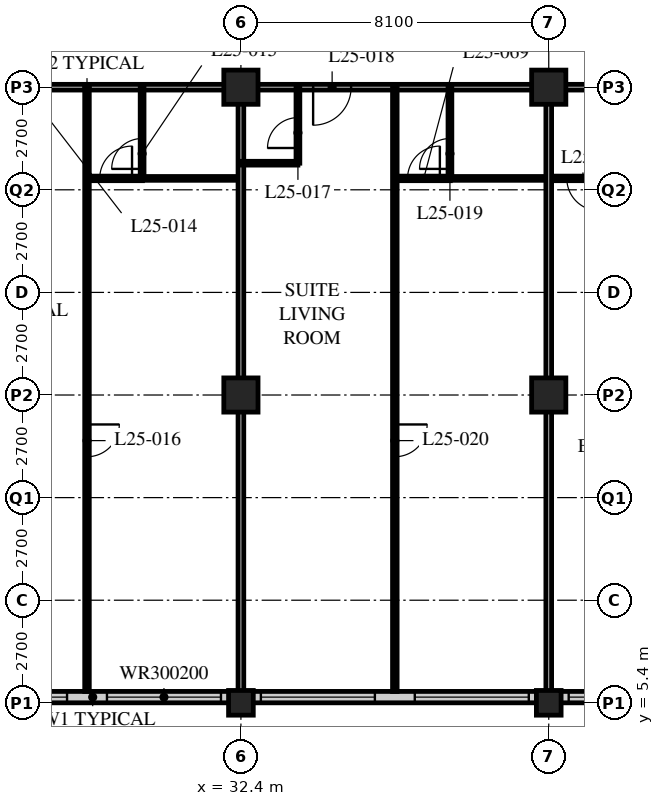
"""IFC4 building model, lengths in metres.
Left out: names, types, materials, properties, quantities, classifications, styles, units other than length and angle.
Written with IfcOpenShell. Run it as: python <this file> out.ifc"""

import sys

from ifc_helpers import new_model, si_unit, direction, frame, frame_2d, origin, origin_2d, place, context, subcontext, project, spatial, rectangle, hollow_rectangle, extrude, element, fill, save


model = new_model("IFC4")
c1 = context("Model", 3, precision=1e-05, world=origin(), true_north=direction((0.0, 1.0)))
c2 = subcontext(c1, "Body", "Model", "MODEL_VIEW")
j1 = project(units=[si_unit("LENGTHUNIT", "METRE"), si_unit("PLANEANGLEUNIT", "RADIAN")], contexts=[c1])
p1 = place(None, origin())
s1 = spatial("IfcSite", under=j1, at=p1, CompositionType="ELEMENT")
p2 = place(p1, origin())
s2 = spatial("IfcBuilding", under=s1, at=p2, CompositionType="ELEMENT")
p3 = place(p2, frame((0.0, 0.0, 103.4)))
s3 = spatial("IfcBuildingStorey", under=s2, at=p3, CompositionType="ELEMENT", Elevation=103.4)
p4 = place(p3, frame((32.4, 5.4, 0.0), z_axis=(0.0, 0.0, 1.0), x_axis=(1.0, 0.0, 0.0)))
e1 = element("IfcColumn", 1, at=p4, inside=s3, PredefinedType="COLUMN", context=c2, shape_type="SweptSolid", body=[
    extrude(hollow_rectangle(XDim=0.65, YDim=0.65, WallThickness=0.055, at=origin_2d()), origin(), (0.0, 0.0, 1.0), 3.4),
])
for number, where, z_axis, x_axis in (
    (2, (32.4, 13.5, 0.0), (0.0, 0.0, 1.0), (1.0, 0.0, 0.0)),
    (3, (32.4, 21.6, 0.0), (0.0, 0.0, 1.0), (1.0, 0.0, 0.0)),
):
    element("IfcColumn", number, at=place(p3, frame(where, z_axis=z_axis, x_axis=x_axis)), inside=s3, PredefinedType="COLUMN", context=c2, shape_type="SweptSolid", body=[
        extrude(hollow_rectangle(XDim=0.9, YDim=0.9, WallThickness=0.1, at=origin_2d()), origin(), (0.0, 0.0, 1.0), 3.4),
    ])
p5 = place(p3, frame((40.5, 5.4, 0.0), z_axis=(0.0, 0.0, 1.0), x_axis=(1.0, 0.0, 0.0)))
e4 = element("IfcColumn", 4, at=p5, inside=s3, PredefinedType="COLUMN", context=c2, shape_type="SweptSolid", body=[
    extrude(hollow_rectangle(XDim=0.65, YDim=0.65, WallThickness=0.055, at=origin_2d()), origin(), (0.0, 0.0, 1.0), 3.4),
])
for number, where, z_axis, x_axis in (
    (5, (40.5, 13.5, 0.0), (0.0, 0.0, 1.0), (1.0, 0.0, 0.0)),
    (6, (40.5, 21.6, 0.0), (0.0, 0.0, 1.0), (1.0, 0.0, 0.0)),
):
    element("IfcColumn", number, at=place(p3, frame(where, z_axis=z_axis, x_axis=x_axis)), inside=s3, PredefinedType="COLUMN", context=c2, shape_type="SweptSolid", body=[
        extrude(hollow_rectangle(XDim=0.9, YDim=0.9, WallThickness=0.1, at=origin_2d()), origin(), (0.0, 0.0, 1.0), 3.4),
    ])
p6 = place(p3, frame((8.4, 5.55, 0.0), z_axis=(0.0, 0.0, 1.0), x_axis=(1.0, 0.0, 0.0)))
e7 = element("IfcWall", 7, at=p6, inside=s3, PredefinedType="SOLIDWALL", context=c2, shape_type="SweptSolid", body=[
    extrude(rectangle(XDim=40.2, YDim=0.3, at=frame_2d((20.1, 0.0))), origin(), (0.0, 0.0, 1.0), 3.19),
])
p7 = place(p6, frame((0.225, 0.0, 0.9)))
e8 = element("IfcOpeningElement", 8, at=p7, cuts=e7, PredefinedType="OPENING", context=c2, shape_type="SweptSolid", body=[
    extrude(rectangle(XDim=3.0, YDim=2.0, at=frame_2d((1.5, 1.0))), frame((0.0, 0.16, 0.0), z_axis=(0.0, -1.0, 0.0), x_axis=(1.0, 0.0, 0.0)), (0.0, 0.0, 1.0), 0.32),
])
p8 = place(p6, frame((4.275, 0.0, 0.9)))
e9 = element("IfcOpeningElement", 9, at=p8, cuts=e7, PredefinedType="OPENING", context=c2, shape_type="SweptSolid", body=[
    extrude(rectangle(XDim=3.0, YDim=2.0, at=frame_2d((1.5, 1.0))), frame((0.0, 0.16, 0.0), z_axis=(0.0, -1.0, 0.0), x_axis=(1.0, 0.0, 0.0)), (0.0, 0.0, 1.0), 0.32),
])
p9 = place(p6, frame((8.325, 0.0, 0.9)))
e10 = element("IfcOpeningElement", 10, at=p9, cuts=e7, PredefinedType="OPENING", context=c2, shape_type="SweptSolid", body=[
    extrude(rectangle(XDim=3.0, YDim=2.0, at=frame_2d((1.5, 1.0))), frame((0.0, 0.16, 0.0), z_axis=(0.0, -1.0, 0.0), x_axis=(1.0, 0.0, 0.0)), (0.0, 0.0, 1.0), 0.32),
])
p10 = place(p6, frame((12.375, 0.0, 0.9)))
e11 = element("IfcOpeningElement", 11, at=p10, cuts=e7, PredefinedType="OPENING", context=c2, shape_type="SweptSolid", body=[
    extrude(rectangle(XDim=3.0, YDim=2.0, at=frame_2d((1.5, 1.0))), frame((0.0, 0.16, 0.0), z_axis=(0.0, -1.0, 0.0), x_axis=(1.0, 0.0, 0.0)), (0.0, 0.0, 1.0), 0.32),
])
p11 = place(p6, frame((16.425, 0.0, 0.9)))
e12 = element("IfcOpeningElement", 12, at=p11, cuts=e7, PredefinedType="OPENING", context=c2, shape_type="SweptSolid", body=[
    extrude(rectangle(XDim=3.0, YDim=2.0, at=frame_2d((1.5, 1.0))), frame((0.0, 0.16, 0.0), z_axis=(0.0, -1.0, 0.0), x_axis=(1.0, 0.0, 0.0)), (0.0, 0.0, 1.0), 0.32),
])
p12 = place(p6, frame((20.475, 0.0, 0.9)))
e13 = element("IfcOpeningElement", 13, at=p12, cuts=e7, PredefinedType="OPENING", context=c2, shape_type="SweptSolid", body=[
    extrude(rectangle(XDim=3.0, YDim=2.0, at=frame_2d((1.5, 1.0))), frame((0.0, 0.16, 0.0), z_axis=(0.0, -1.0, 0.0), x_axis=(1.0, 0.0, 0.0)), (0.0, 0.0, 1.0), 0.32),
])
p13 = place(p6, frame((24.525, 0.0, 0.9)))
e14 = element("IfcOpeningElement", 14, at=p13, cuts=e7, PredefinedType="OPENING", context=c2, shape_type="SweptSolid", body=[
    extrude(rectangle(XDim=3.0, YDim=2.0, at=frame_2d((1.5, 1.0))), frame((0.0, 0.16, 0.0), z_axis=(0.0, -1.0, 0.0), x_axis=(1.0, 0.0, 0.0)), (0.0, 0.0, 1.0), 0.32),
])
p14 = place(p6, frame((28.575, 0.0, 0.9)))
e15 = element("IfcOpeningElement", 15, at=p14, cuts=e7, PredefinedType="OPENING", context=c2, shape_type="SweptSolid", body=[
    extrude(rectangle(XDim=3.0, YDim=2.0, at=frame_2d((1.5, 1.0))), frame((0.0, 0.16, 0.0), z_axis=(0.0, -1.0, 0.0), x_axis=(1.0, 0.0, 0.0)), (0.0, 0.0, 1.0), 0.32),
])
p15 = place(p6, frame((32.625, 0.0, 0.9)))
e16 = element("IfcOpeningElement", 16, at=p15, cuts=e7, PredefinedType="OPENING", context=c2, shape_type="SweptSolid", body=[
    extrude(rectangle(XDim=3.0, YDim=2.0, at=frame_2d((1.5, 1.0))), frame((0.0, 0.16, 0.0), z_axis=(0.0, -1.0, 0.0), x_axis=(1.0, 0.0, 0.0)), (0.0, 0.0, 1.0), 0.32),
])
p16 = place(p6, frame((36.675, 0.0, 0.9)))
e17 = element("IfcOpeningElement", 17, at=p16, cuts=e7, PredefinedType="OPENING", context=c2, shape_type="SweptSolid", body=[
    extrude(rectangle(XDim=3.0, YDim=2.0, at=frame_2d((1.5, 1.0))), frame((0.0, 0.16, 0.0), z_axis=(0.0, -1.0, 0.0), x_axis=(1.0, 0.0, 0.0)), (0.0, 0.0, 1.0), 0.32),
])
p17 = place(p3, frame((12.15, 21.6, 0.0), z_axis=(0.0, 0.0, 1.0), x_axis=(1.0, 0.0, 0.0)))
e18 = element("IfcWall", 18, at=p17, inside=s3, PredefinedType="PARTITIONING", context=c2, shape_type="SweptSolid", body=[
    extrude(rectangle(XDim=32.4, YDim=0.15, at=frame_2d((16.2, 0.0))), origin(), (0.0, 0.0, 1.0), 2.578),
])
p18 = place(p17, frame((5.95, 0.0, 0.0)))
e19 = element("IfcOpeningElement", 19, at=p18, cuts=e18, PredefinedType="OPENING", context=c2, shape_type="SweptSolid", body=[
    extrude(rectangle(XDim=1.0, YDim=2.1, at=frame_2d((0.5, 1.05))), frame((0.0, 0.085, 0.0), z_axis=(0.0, -1.0, 0.0), x_axis=(1.0, 0.0, 0.0)), (0.0, 0.0, 1.0), 0.17),
])
p19 = place(p17, frame((14.05, 0.0, 0.0)))
e20 = element("IfcOpeningElement", 20, at=p19, cuts=e18, PredefinedType="OPENING", context=c2, shape_type="SweptSolid", body=[
    extrude(rectangle(XDim=1.0, YDim=2.1, at=frame_2d((0.5, 1.05))), frame((0.0, 0.085, 0.0), z_axis=(0.0, -1.0, 0.0), x_axis=(1.0, 0.0, 0.0)), (0.0, 0.0, 1.0), 0.17),
])
p20 = place(p17, frame((22.15, 0.0, 0.0)))
e21 = element("IfcOpeningElement", 21, at=p20, cuts=e18, PredefinedType="OPENING", context=c2, shape_type="SweptSolid", body=[
    extrude(rectangle(XDim=1.0, YDim=2.1, at=frame_2d((0.5, 1.05))), frame((0.0, 0.085, 0.0), z_axis=(0.0, -1.0, 0.0), x_axis=(1.0, 0.0, 0.0)), (0.0, 0.0, 1.0), 0.17),
])
p21 = place(p17, frame((1.525, 0.0, 0.0)))
e22 = element("IfcOpeningElement", 22, at=p21, cuts=e18, PredefinedType="OPENING", context=c2, shape_type="SweptSolid", body=[
    extrude(rectangle(XDim=1.0, YDim=2.1, at=frame_2d((0.5, 1.05))), frame((0.0, 0.085, 0.0), z_axis=(0.0, -1.0, 0.0), x_axis=(1.0, 0.0, 0.0)), (0.0, 0.0, 1.0), 0.17),
])
p22 = place(p17, frame((29.875, 0.0, 0.0)))
e23 = element("IfcOpeningElement", 23, at=p22, cuts=e18, PredefinedType="OPENING", context=c2, shape_type="SweptSolid", body=[
    extrude(rectangle(XDim=1.0, YDim=2.1, at=frame_2d((0.5, 1.05))), frame((0.0, 0.085, 0.0), z_axis=(0.0, -1.0, 0.0), x_axis=(1.0, 0.0, 0.0)), (0.0, 0.0, 1.0), 0.17),
])
p23 = place(p3, frame((29.8, 19.2, 0.0), z_axis=(0.0, 0.0, 1.0), x_axis=(1.0, 0.0, 0.0)))
e24 = element("IfcWall", 24, at=p23, inside=s3, PredefinedType="PARTITIONING", context=c2, shape_type="SweptSolid", body=[
    extrude(rectangle(XDim=2.6, YDim=0.1, at=frame_2d((1.3, 0.0))), origin(), (0.0, 0.0, 1.0), 3.19),
])
p24 = place(p3, frame((29.8, 21.6, 0.0), z_axis=(0.0, 0.0, 1.0), x_axis=(0.0, -1.0, 0.0)))
e25 = element("IfcWall", 25, at=p24, inside=s3, PredefinedType="PARTITIONING", context=c2, shape_type="SweptSolid", body=[
    extrude(rectangle(XDim=2.4, YDim=0.1, at=frame_2d((1.2, 0.0))), origin(), (0.0, 0.0, 1.0), 3.19),
])
p25 = place(p24, frame((1.35, 0.0, 0.0)))
e26 = element("IfcOpeningElement", 26, at=p25, cuts=e25, PredefinedType="OPENING", context=c2, shape_type="SweptSolid", body=[
    extrude(rectangle(XDim=0.8, YDim=2.1, at=frame_2d((0.4, 1.05))), frame((0.0, 0.06, 0.0), z_axis=(0.0, -1.0, 0.0), x_axis=(1.0, 0.0, 0.0)), (0.0, 0.0, 1.0), 0.12),
])
p26 = place(p3, frame((28.35, 21.6, 0.0), z_axis=(0.0, 0.0, 1.0), x_axis=(0.0, -1.0, 0.0)))
e27 = element("IfcWall", 27, at=p26, inside=s3, PredefinedType="PARTITIONING", context=c2, shape_type="SweptSolid", body=[
    extrude(rectangle(XDim=15.9, YDim=0.12, at=frame_2d((7.95, 0.0))), origin(), (0.0, 0.0, 1.0), 3.19),
])
p27 = place(p26, frame((8.875, 0.0, 0.0)))
e28 = element("IfcOpeningElement", 28, at=p27, cuts=e27, PredefinedType="OPENING", context=c2, shape_type="SweptSolid", body=[
    extrude(rectangle(XDim=0.85, YDim=2.1, at=frame_2d((0.425, 1.05))), frame((0.0, 0.07, 0.0), z_axis=(0.0, -1.0, 0.0), x_axis=(1.0, 0.0, 0.0)), (0.0, 0.0, 1.0), 0.14),
])
p28 = place(p3, frame((32.4, 21.6, 0.0), z_axis=(0.0, 0.0, 1.0), x_axis=(0.0, -1.0, 0.0)))
e29 = element("IfcWall", 29, at=p28, inside=s3, PredefinedType="PARTITIONING", context=c2, shape_type="SweptSolid", body=[
    extrude(rectangle(XDim=15.9, YDim=0.15, at=frame_2d((7.95, 0.0))), origin(), (0.0, 0.0, 1.0), 2.578),
])
p29 = place(p3, frame((32.4, 19.6, 0.0), z_axis=(0.0, 0.0, 1.0), x_axis=(1.0, 0.0, 0.0)))
e30 = element("IfcWall", 30, at=p29, inside=s3, PredefinedType="PARTITIONING", context=c2, shape_type="SweptSolid", body=[
    extrude(rectangle(XDim=1.5, YDim=0.1, at=frame_2d((0.75, 0.0))), origin(), (0.0, 0.0, 1.0), 3.19),
])
p30 = place(p3, frame((33.9, 21.6, 0.0), z_axis=(0.0, 0.0, 1.0), x_axis=(0.0, -1.0, 0.0)))
e31 = element("IfcWall", 31, at=p30, inside=s3, PredefinedType="PARTITIONING", context=c2, shape_type="SweptSolid", body=[
    extrude(rectangle(XDim=2.0, YDim=0.1, at=frame_2d((1.0, 0.0))), origin(), (0.0, 0.0, 1.0), 3.19),
])
p31 = place(p30, frame((0.8, 0.0, 0.0)))
e32 = element("IfcOpeningElement", 32, at=p31, cuts=e31, PredefinedType="OPENING", context=c2, shape_type="SweptSolid", body=[
    extrude(rectangle(XDim=0.8, YDim=2.1, at=frame_2d((0.4, 1.05))), frame((0.0, 0.06, 0.0), z_axis=(0.0, -1.0, 0.0), x_axis=(1.0, 0.0, 0.0)), (0.0, 0.0, 1.0), 0.12),
])
p32 = place(p3, frame((37.9, 19.2, 0.0), z_axis=(0.0, 0.0, 1.0), x_axis=(1.0, 0.0, 0.0)))
e33 = element("IfcWall", 33, at=p32, inside=s3, PredefinedType="PARTITIONING", context=c2, shape_type="SweptSolid", body=[
    extrude(rectangle(XDim=2.6, YDim=0.1, at=frame_2d((1.3, 0.0))), origin(), (0.0, 0.0, 1.0), 3.19),
])
p33 = place(p3, frame((37.9, 21.6, 0.0), z_axis=(0.0, 0.0, 1.0), x_axis=(0.0, -1.0, 0.0)))
e34 = element("IfcWall", 34, at=p33, inside=s3, PredefinedType="PARTITIONING", context=c2, shape_type="SweptSolid", body=[
    extrude(rectangle(XDim=2.4, YDim=0.1, at=frame_2d((1.2, 0.0))), origin(), (0.0, 0.0, 1.0), 3.19),
])
p34 = place(p33, frame((1.35, 0.0, 0.0)))
e35 = element("IfcOpeningElement", 35, at=p34, cuts=e34, PredefinedType="OPENING", context=c2, shape_type="SweptSolid", body=[
    extrude(rectangle(XDim=0.8, YDim=2.1, at=frame_2d((0.4, 1.05))), frame((0.0, 0.06, 0.0), z_axis=(0.0, -1.0, 0.0), x_axis=(1.0, 0.0, 0.0)), (0.0, 0.0, 1.0), 0.12),
])
p35 = place(p3, frame((36.45, 21.6, 0.0), z_axis=(0.0, 0.0, 1.0), x_axis=(0.0, -1.0, 0.0)))
e36 = element("IfcWall", 36, at=p35, inside=s3, PredefinedType="PARTITIONING", context=c2, shape_type="SweptSolid", body=[
    extrude(rectangle(XDim=15.9, YDim=0.12, at=frame_2d((7.95, 0.0))), origin(), (0.0, 0.0, 1.0), 3.19),
])
p36 = place(p35, frame((8.875, 0.0, 0.0)))
e37 = element("IfcOpeningElement", 37, at=p36, cuts=e36, PredefinedType="OPENING", context=c2, shape_type="SweptSolid", body=[
    extrude(rectangle(XDim=0.85, YDim=2.1, at=frame_2d((0.425, 1.05))), frame((0.0, 0.07, 0.0), z_axis=(0.0, -1.0, 0.0), x_axis=(1.0, 0.0, 0.0)), (0.0, 0.0, 1.0), 0.14),
])
p37 = place(p3, frame((40.5, 19.2, 0.0), z_axis=(0.0, 0.0, 1.0), x_axis=(1.0, 0.0, 0.0)))
e38 = element("IfcWall", 38, at=p37, inside=s3, PredefinedType="PARTITIONING", context=c2, shape_type="SweptSolid", body=[
    extrude(rectangle(XDim=8.05, YDim=0.12, at=frame_2d((4.025, 0.0))), origin(), (0.0, 0.0, 1.0), 3.19),
])
p38 = place(p37, frame((0.475, 0.0, 0.0)))
e39 = element("IfcOpeningElement", 39, at=p38, cuts=e38, PredefinedType="OPENING", context=c2, shape_type="SweptSolid", body=[
    extrude(rectangle(XDim=0.85, YDim=2.1, at=frame_2d((0.425, 1.05))), frame((0.0, 0.07, 0.0), z_axis=(0.0, -1.0, 0.0), x_axis=(1.0, 0.0, 0.0)), (0.0, 0.0, 1.0), 0.14),
])
p39 = place(p37, frame((4.325, 0.0, 0.0)))
e40 = element("IfcOpeningElement", 40, at=p39, cuts=e38, PredefinedType="OPENING", context=c2, shape_type="SweptSolid", body=[
    extrude(rectangle(XDim=0.85, YDim=2.1, at=frame_2d((0.425, 1.05))), frame((0.0, 0.07, 0.0), z_axis=(0.0, -1.0, 0.0), x_axis=(1.0, 0.0, 0.0)), (0.0, 0.0, 1.0), 0.14),
])
p40 = place(p3, frame((40.5, 21.6, 0.0), z_axis=(0.0, 0.0, 1.0), x_axis=(0.0, -1.0, 0.0)))
e41 = element("IfcWall", 41, at=p40, inside=s3, PredefinedType="PARTITIONING", context=c2, shape_type="SweptSolid", body=[
    extrude(rectangle(XDim=15.9, YDim=0.15, at=frame_2d((7.95, 0.0))), origin(), (0.0, 0.0, 1.0), 2.578),
])
p41 = place(p3, frame((29.81, 19.2, 0.0), z_axis=(0.0, 0.0, 1.0), x_axis=(-1.0, 0.0, 0.0)))
e42 = element("IfcWall", 42, at=p41, inside=s3, PredefinedType="PARTITIONING", context=c2, shape_type="SweptSolid", body=[
    extrude(rectangle(XDim=1.46, YDim=0.12, at=frame_2d((0.73, 0.0))), origin(), (0.0, 0.0, 1.0), 3.19),
])
p42 = place(p41, frame((0.275, 0.0, 0.0)))
e43 = element("IfcOpeningElement", 43, at=p42, cuts=e42, PredefinedType="OPENING", context=c2, shape_type="SweptSolid", body=[
    extrude(rectangle(XDim=0.85, YDim=2.1, at=frame_2d((0.425, 1.05))), frame((0.0, 0.07, 0.0), z_axis=(0.0, -1.0, 0.0), x_axis=(1.0, 0.0, 0.0)), (0.0, 0.0, 1.0), 0.14),
])
p43 = place(p3, frame((37.91, 19.2, 0.0), z_axis=(0.0, 0.0, 1.0), x_axis=(-1.0, 0.0, 0.0)))
e44 = element("IfcWall", 44, at=p43, inside=s3, PredefinedType="PARTITIONING", context=c2, shape_type="SweptSolid", body=[
    extrude(rectangle(XDim=1.46, YDim=0.12, at=frame_2d((0.73, 0.0))), origin(), (0.0, 0.0, 1.0), 3.19),
])
p44 = place(p43, frame((0.275, 0.0, 0.0)))
e45 = element("IfcOpeningElement", 45, at=p44, cuts=e44, PredefinedType="OPENING", context=c2, shape_type="SweptSolid", body=[
    extrude(rectangle(XDim=0.85, YDim=2.1, at=frame_2d((0.425, 1.05))), frame((0.0, 0.07, 0.0), z_axis=(0.0, -1.0, 0.0), x_axis=(1.0, 0.0, 0.0)), (0.0, 0.0, 1.0), 0.14),
])
p45 = place(p11, origin())
e46 = element("IfcWindow", 46, at=p45, inside=s3, PartitioningType="SINGLE_PANEL", PredefinedType="WINDOW", context=c2, shape_type="SweptSolid", body=[
    extrude(rectangle(XDim=3.0, YDim=2.0, at=frame_2d((1.5, 1.0))), frame((0.0, 0.03, 0.0), z_axis=(0.0, -1.0, 0.0), x_axis=(1.0, 0.0, 0.0)), (0.0, 0.0, 1.0), 0.06),
])
fill(e12, e46)
p46 = place(p12, origin())
e47 = element("IfcWindow", 47, at=p46, inside=s3, PartitioningType="SINGLE_PANEL", PredefinedType="WINDOW", context=c2, shape_type="SweptSolid", body=[
    extrude(rectangle(XDim=3.0, YDim=2.0, at=frame_2d((1.5, 1.0))), frame((0.0, 0.03, 0.0), z_axis=(0.0, -1.0, 0.0), x_axis=(1.0, 0.0, 0.0)), (0.0, 0.0, 1.0), 0.06),
])
fill(e13, e47)
p47 = place(p13, origin())
e48 = element("IfcWindow", 48, at=p47, inside=s3, PartitioningType="SINGLE_PANEL", PredefinedType="WINDOW", context=c2, shape_type="SweptSolid", body=[
    extrude(rectangle(XDim=3.0, YDim=2.0, at=frame_2d((1.5, 1.0))), frame((0.0, 0.03, 0.0), z_axis=(0.0, -1.0, 0.0), x_axis=(1.0, 0.0, 0.0)), (0.0, 0.0, 1.0), 0.06),
])
fill(e14, e48)
p48 = place(p14, origin())
e49 = element("IfcWindow", 49, at=p48, inside=s3, PartitioningType="SINGLE_PANEL", PredefinedType="WINDOW", context=c2, shape_type="SweptSolid", body=[
    extrude(rectangle(XDim=3.0, YDim=2.0, at=frame_2d((1.5, 1.0))), frame((0.0, 0.03, 0.0), z_axis=(0.0, -1.0, 0.0), x_axis=(1.0, 0.0, 0.0)), (0.0, 0.0, 1.0), 0.06),
])
fill(e15, e49)
p49 = place(p15, origin())
e50 = element("IfcWindow", 50, at=p49, inside=s3, PartitioningType="SINGLE_PANEL", PredefinedType="WINDOW", context=c2, shape_type="SweptSolid", body=[
    extrude(rectangle(XDim=3.0, YDim=2.0, at=frame_2d((1.5, 1.0))), frame((0.0, 0.03, 0.0), z_axis=(0.0, -1.0, 0.0), x_axis=(1.0, 0.0, 0.0)), (0.0, 0.0, 1.0), 0.06),
])
fill(e16, e50)
p50 = place(p25, origin())
e51 = element("IfcDoor", 51, at=p50, inside=s3, OperationType="SINGLE_SWING_LEFT", PredefinedType="DOOR", context=c2, shape_type="SweptSolid", body=[
    extrude(rectangle(XDim=0.8, YDim=2.1, at=frame_2d((0.4, 1.05))), frame((0.0, 0.025, 0.0), z_axis=(0.0, -1.0, 0.0), x_axis=(1.0, 0.0, 0.0)), (0.0, 0.0, 1.0), 0.05),
])
fill(e26, e51)
p51 = place(p27, origin())
e52 = element("IfcDoor", 52, at=p51, inside=s3, OperationType="SINGLE_SWING_LEFT", PredefinedType="DOOR", context=c2, shape_type="SweptSolid", body=[
    extrude(rectangle(XDim=0.85, YDim=2.1, at=frame_2d((0.425, 1.05))), frame((0.0, 0.025, 0.0), z_axis=(0.0, -1.0, 0.0), x_axis=(1.0, 0.0, 0.0)), (0.0, 0.0, 1.0), 0.05),
])
fill(e28, e52)
p52 = place(p31, origin())
e53 = element("IfcDoor", 53, at=p52, inside=s3, OperationType="SINGLE_SWING_LEFT", PredefinedType="DOOR", context=c2, shape_type="SweptSolid", body=[
    extrude(rectangle(XDim=0.8, YDim=2.1, at=frame_2d((0.4, 1.05))), frame((0.0, 0.025, 0.0), z_axis=(0.0, -1.0, 0.0), x_axis=(1.0, 0.0, 0.0)), (0.0, 0.0, 1.0), 0.05),
])
fill(e32, e53)
p53 = place(p20, origin())
e54 = element("IfcDoor", 54, at=p53, inside=s3, OperationType="SINGLE_SWING_RIGHT", PredefinedType="DOOR", context=c2, shape_type="SweptSolid", body=[
    extrude(rectangle(XDim=1.0, YDim=2.1, at=frame_2d((0.5, 1.05))), frame((0.0, 0.025, 0.0), z_axis=(0.0, -1.0, 0.0), x_axis=(1.0, 0.0, 0.0)), (0.0, 0.0, 1.0), 0.05),
])
fill(e21, e54)
p54 = place(p34, origin())
e55 = element("IfcDoor", 55, at=p54, inside=s3, OperationType="SINGLE_SWING_LEFT", PredefinedType="DOOR", context=c2, shape_type="SweptSolid", body=[
    extrude(rectangle(XDim=0.8, YDim=2.1, at=frame_2d((0.4, 1.05))), frame((0.0, 0.025, 0.0), z_axis=(0.0, -1.0, 0.0), x_axis=(1.0, 0.0, 0.0)), (0.0, 0.0, 1.0), 0.05),
])
fill(e35, e55)
p55 = place(p36, origin())
e56 = element("IfcDoor", 56, at=p55, inside=s3, OperationType="SINGLE_SWING_LEFT", PredefinedType="DOOR", context=c2, shape_type="SweptSolid", body=[
    extrude(rectangle(XDim=0.85, YDim=2.1, at=frame_2d((0.425, 1.05))), frame((0.0, 0.025, 0.0), z_axis=(0.0, -1.0, 0.0), x_axis=(1.0, 0.0, 0.0)), (0.0, 0.0, 1.0), 0.05),
])
fill(e37, e56)
p56 = place(p38, origin())
e57 = element("IfcDoor", 57, at=p56, inside=s3, OperationType="SINGLE_SWING_LEFT", PredefinedType="DOOR", context=c2, shape_type="SweptSolid", body=[
    extrude(rectangle(XDim=0.85, YDim=2.1, at=frame_2d((0.425, 1.05))), frame((0.0, 0.025, 0.0), z_axis=(0.0, -1.0, 0.0), x_axis=(1.0, 0.0, 0.0)), (0.0, 0.0, 1.0), 0.05),
])
fill(e39, e57)
p57 = place(p42, origin())
e58 = element("IfcDoor", 58, at=p57, inside=s3, OperationType="SINGLE_SWING_RIGHT", PredefinedType="DOOR", context=c2, shape_type="SweptSolid", body=[
    extrude(rectangle(XDim=0.85, YDim=2.1, at=frame_2d((0.425, 1.05))), frame((0.0, 0.025, 0.0), z_axis=(0.0, -1.0, 0.0), x_axis=(1.0, 0.0, 0.0)), (0.0, 0.0, 1.0), 0.05),
])
fill(e43, e58)
p58 = place(p44, origin())
e59 = element("IfcDoor", 59, at=p58, inside=s3, OperationType="SINGLE_SWING_RIGHT", PredefinedType="DOOR", context=c2, shape_type="SweptSolid", body=[
    extrude(rectangle(XDim=0.85, YDim=2.1, at=frame_2d((0.425, 1.05))), frame((0.0, 0.025, 0.0), z_axis=(0.0, -1.0, 0.0), x_axis=(1.0, 0.0, 0.0)), (0.0, 0.0, 1.0), 0.05),
])
fill(e45, e59)
save(model, sys.argv[1])
